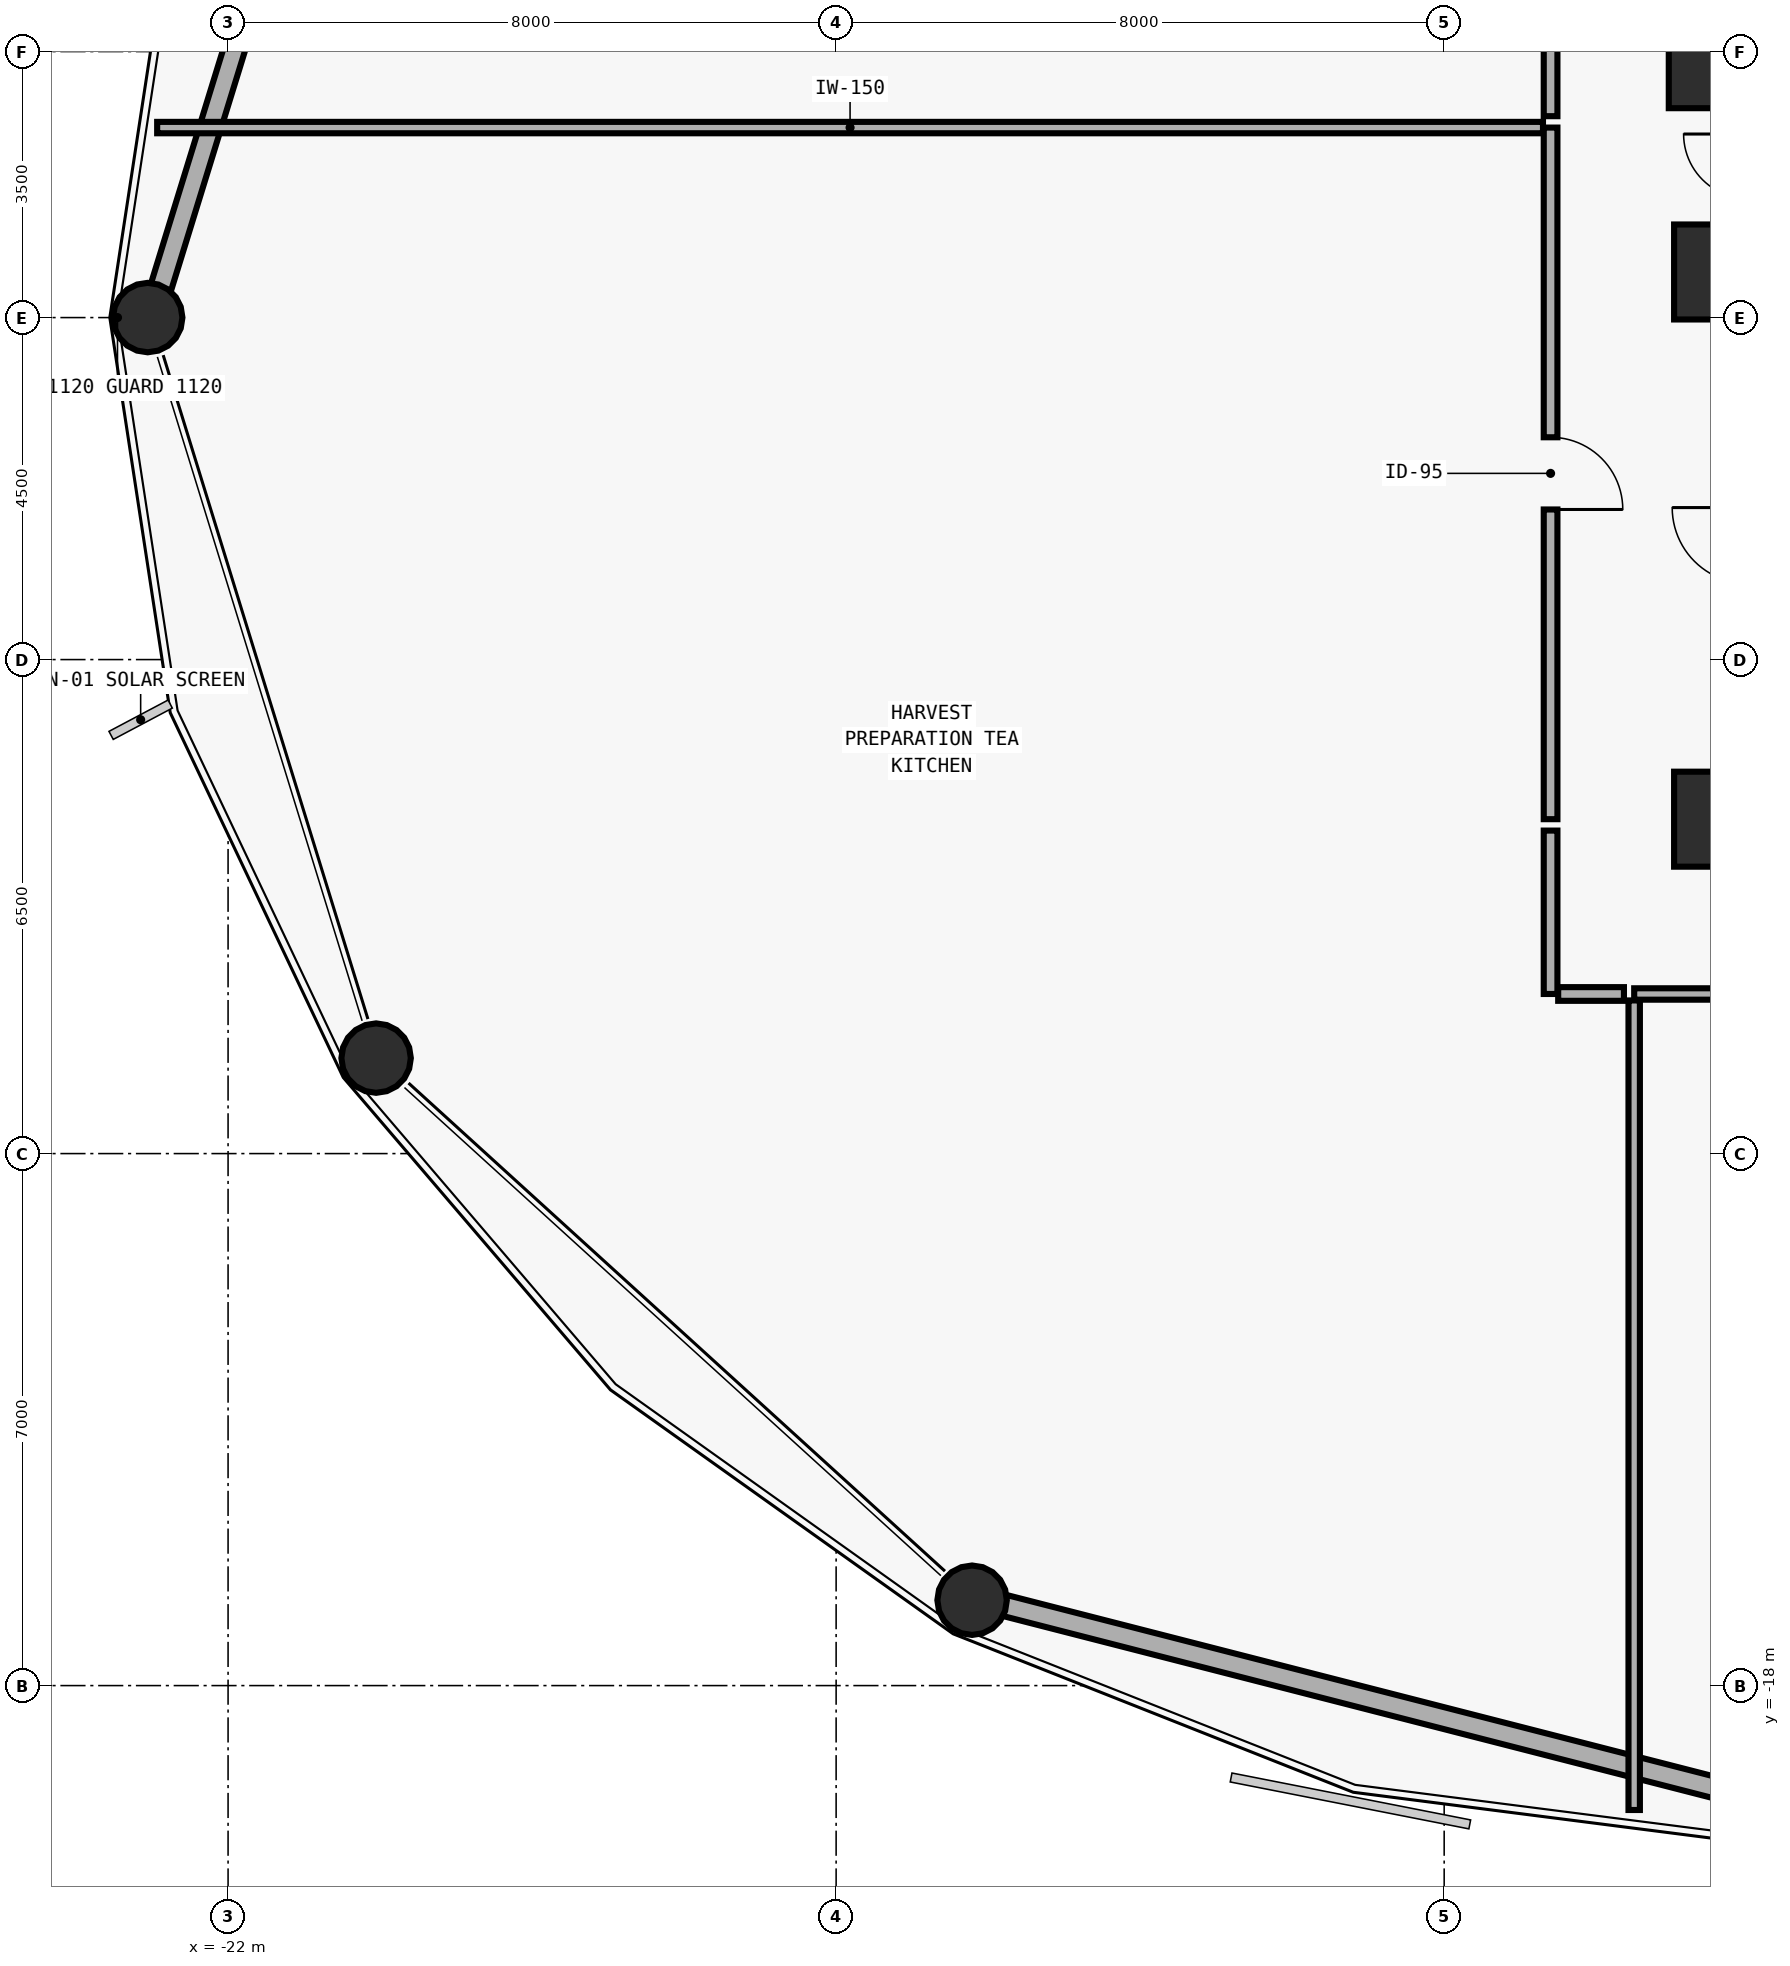
"""IFC4 building model, lengths in metres.
Left out: names, types, materials, properties, quantities, classifications, styles, units other than length and angle.
Written with IfcOpenShell. Run it as: python <this file> out.ifc"""

import sys

from ifc_helpers import new_model, si_unit, direction, frame, frame_2d, origin, origin_2d, place, context, subcontext, project, spatial, rectangle, hollow_circle, extrude, element, fill, save


model = new_model("IFC4")
c1 = context("Model", 3, precision=1e-05, world=origin(), true_north=direction((0.0, 1.0)))
c2 = subcontext(c1, "Body", "Model", "MODEL_VIEW")
j1 = project(units=[si_unit("LENGTHUNIT", "METRE"), si_unit("PLANEANGLEUNIT", "RADIAN")], contexts=[c1])
p1 = place(None, origin())
s1 = spatial("IfcSite", under=j1, at=p1, CompositionType="ELEMENT")
p2 = place(p1, origin())
s2 = spatial("IfcBuilding", under=s1, at=p2, CompositionType="ELEMENT")
p3 = place(p2, frame((0.0, 0.0, 62.7)))
s3 = spatial("IfcBuildingStorey", under=s2, at=p3, CompositionType="ELEMENT", Elevation=62.7)
for number, where, z_axis, x_axis in (
    (1, (-2.42, 3.38, 0.0), (0.0, 0.0, 1.0), (1.0, 0.0, 0.0)),
    (2, (-2.35, 0.6, 0.0), (0.0, 0.0, 1.0), (1.0, 0.0, 0.0)),
    (3, (-2.35, -6.6, 0.0), (0.0, 0.0, 1.0), (1.0, 0.0, 0.0)),
):
    element("IfcColumn", number, at=place(p3, frame(where, z_axis=z_axis, x_axis=x_axis)), inside=s3, PredefinedType="COLUMN", context=c2, shape_type="SweptSolid", body=[
        extrude(rectangle(XDim=1.25, YDim=1.25, at=origin_2d()), origin(), (0.0, 0.0, 1.0), 3.875),
    ])
p4 = place(p3, frame((-23.006, 0.0, 0.0), z_axis=(-0.026515371649, 0.0, 0.999648405724), x_axis=(0.0, -1.0, 0.0)))
e4 = element("IfcColumn", 4, at=p4, inside=s3, PredefinedType="COLUMN", context=c2, shape_type="SweptSolid", body=[
    extrude(hollow_circle(Radius=0.457, WallThickness=0.032, at=origin_2d()), origin(), (0.0, 0.0, 1.0), 3.876),
])
p5 = place(p3, frame((-20.008, -9.724, 0.0), z_axis=(-0.022989211418, -0.01014044668, 0.999684283911), x_axis=(0.403578491135, -0.914945026487, 0.0)))
e5 = element("IfcColumn", 5, at=p5, inside=s3, PredefinedType="COLUMN", context=c2, shape_type="SweptSolid", body=[
    extrude(hollow_circle(Radius=0.457, WallThickness=0.032, at=origin_2d()), origin(), (0.0, 0.0, 1.0), 3.876),
])
p6 = place(p3, frame((-12.186, -16.843, 0.0), z_axis=(-0.013290608719, -0.017636826737, 0.999756121293), x_axis=(0.798628839349, -0.601823875366, 0.0)))
e6 = element("IfcColumn", 6, at=p6, inside=s3, PredefinedType="COLUMN", context=c2, shape_type="SweptSolid", body=[
    extrude(hollow_circle(Radius=0.457, WallThickness=0.032, at=origin_2d()), origin(), (0.0, 0.0, 1.0), 3.876),
])
p7 = place(p3, frame((-22.885, 0.394, 0.0), z_axis=(0.0, 0.0, 1.0), x_axis=(0.294639825204, 0.95560837868, 0.0)))
e7 = element("IfcWall", 7, at=p7, inside=s3, PredefinedType="SOLIDWALL", context=c2, shape_type="SweptSolid", body=[
    extrude(rectangle(XDim=9.352, YDim=0.28, at=frame_2d((4.676, 0.0))), origin(), (0.0, 0.0, 1.0), 3.06),
])
p8 = place(p3, frame((-1.899, -19.481, 0.0), z_axis=(0.0, 0.0, 1.0), x_axis=(-0.968647190334, 0.248440376463, 0.0)))
e8 = element("IfcWall", 8, at=p8, inside=s3, PredefinedType="SOLIDWALL", context=c2, shape_type="SweptSolid", body=[
    extrude(rectangle(XDim=10.207, YDim=0.28, at=frame_2d((5.104, 0.0))), origin(), (0.0, 0.0, 1.0), 3.06),
])
p9 = place(p3, frame((-4.6, 2.5, 0.0), z_axis=(0.0, 0.0, 1.0), x_axis=(0.0, -1.0, 0.0)))
e9 = element("IfcWall", 9, at=p9, inside=s3, PredefinedType="PLUMBINGWALL", context=c2, shape_type="SweptSolid", body=[
    extrude(rectangle(XDim=9.1, YDim=0.18, at=frame_2d((4.55, 0.0))), origin(), (0.0, 0.0, 1.0), 3.64),
])
p10 = place(p9, frame((4.075, 0.0, 0.0)))
e10 = element("IfcOpeningElement", 10, at=p10, cuts=e9, PredefinedType="OPENING", context=c2, shape_type="SweptSolid", body=[
    extrude(rectangle(XDim=0.95, YDim=2.1, at=frame_2d((0.475, 1.05))), frame((0.0, 0.1, 0.0), z_axis=(0.0, -1.0, 0.0), x_axis=(1.0, 0.0, 0.0)), (0.0, 0.0, 1.0), 0.2),
])
p11 = place(p3, frame((-4.6, 12.5, 0.0), z_axis=(0.0, 0.0, 1.0), x_axis=(0.0, -1.0, 0.0)))
e11 = element("IfcWall", 11, at=p11, inside=s3, PredefinedType="PLUMBINGWALL", context=c2, shape_type="SweptSolid", body=[
    extrude(rectangle(XDim=9.85, YDim=0.18, at=frame_2d((4.925, 0.0))), origin(), (0.0, 0.0, 1.0), 3.64),
])
p12 = place(p11, frame((4.525, 0.0, 0.0)))
e12 = element("IfcOpeningElement", 12, at=p12, cuts=e11, PredefinedType="OPENING", context=c2, shape_type="SweptSolid", body=[
    extrude(rectangle(XDim=0.95, YDim=2.1, at=frame_2d((0.475, 1.05))), frame((0.0, 0.1, 0.0), z_axis=(0.0, -1.0, 0.0), x_axis=(1.0, 0.0, 0.0)), (0.0, 0.0, 1.0), 0.2),
])
p13 = place(p3, frame((-3.5, -8.9, 0.0), z_axis=(0.0, 0.0, 1.0), x_axis=(1.0, 0.0, 0.0)))
e13 = element("IfcWall", 13, at=p13, inside=s3, PredefinedType="PARTITIONING", context=c2, shape_type="SweptSolid", body=[
    extrude(rectangle(XDim=1.365, YDim=0.15, at=frame_2d((0.683, 0.0))), origin(), (0.0, 0.0, 1.0), 3.64),
])
p14 = place(p3, frame((-3.5, -19.637, 0.0), z_axis=(0.0, 0.0, 1.0), x_axis=(0.0, 1.0, 0.0)))
e14 = element("IfcWall", 14, at=p14, inside=s3, PredefinedType="PARTITIONING", context=c2, shape_type="SweptSolid", body=[
    extrude(rectangle(XDim=10.652, YDim=0.15, at=frame_2d((5.326, 0.0))), origin(), (0.0, 0.0, 1.0), 3.64),
])
p15 = place(p3, frame((-4.6, -6.75, 0.0), z_axis=(0.0, 0.0, 1.0), x_axis=(0.0, -1.0, 0.0)))
e15 = element("IfcWall", 15, at=p15, inside=s3, PredefinedType="PLUMBINGWALL", context=c2, shape_type="SweptSolid", body=[
    extrude(rectangle(XDim=2.15, YDim=0.18, at=frame_2d((1.075, 0.0))), origin(), (0.0, 0.0, 1.0), 3.64),
])
p16 = place(p3, frame((-4.5, -8.9, 0.0), z_axis=(0.0, 0.0, 1.0), x_axis=(1.0, 0.0, 0.0)))
e16 = element("IfcWall", 16, at=p16, inside=s3, PredefinedType="PLUMBINGWALL", context=c2, shape_type="SweptSolid", body=[
    extrude(rectangle(XDim=0.865, YDim=0.18, at=frame_2d((0.433, 0.0))), origin(), (0.0, 0.0, 1.0), 3.64),
])
p17 = place(p3, frame((-22.933, 2.5, 0.0), z_axis=(0.0, 0.0, 1.0), x_axis=(1.0, 0.0, 0.0)))
e17 = element("IfcWall", 17, at=p17, inside=s3, PredefinedType="PARTITIONING", context=c2, shape_type="SweptSolid", body=[
    extrude(rectangle(XDim=18.233, YDim=0.15, at=frame_2d((9.117, 0.0))), origin(), (0.0, 0.0, 1.0), 3.64),
])
p18 = place(p10, origin())
e18 = element("IfcDoor", 18, at=p18, inside=s3, OperationType="SINGLE_SWING_RIGHT", PredefinedType="DOOR", context=c2, shape_type="SweptSolid", body=[
    extrude(rectangle(XDim=0.95, YDim=2.1, at=frame_2d((0.475, 1.05))), frame((0.0, 0.025, 0.0), z_axis=(0.0, -1.0, 0.0), x_axis=(1.0, 0.0, 0.0)), (0.0, 0.0, 1.0), 0.05),
])
fill(e10, e18)
save(model, sys.argv[1])
